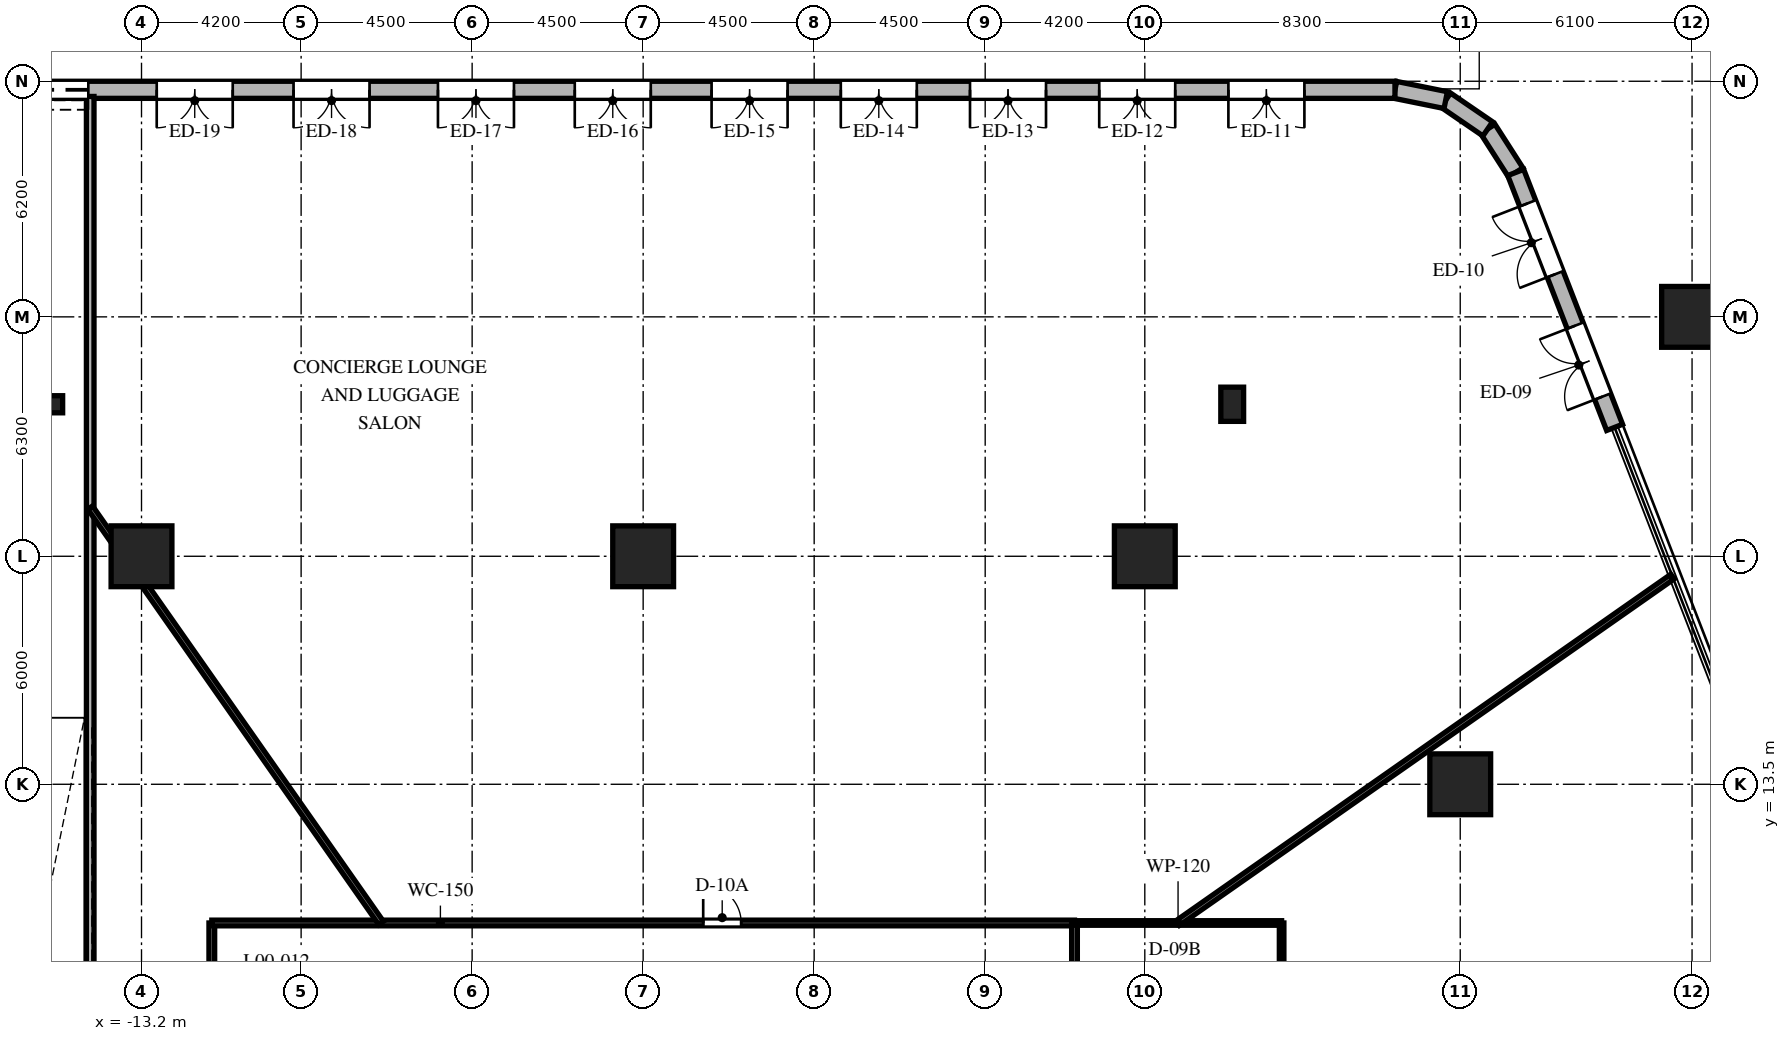
"""IFC4 building model, lengths in metres.
Left out: names, types, materials, properties, quantities, classifications, styles, units other than length and angle.
Written with IfcOpenShell. Run it as: python <this file> out.ifc"""

import sys

from ifc_helpers import new_model, si_unit, direction, frame, frame_2d, origin, origin_2d, place, context, subcontext, project, spatial, rectangle, extrude, element, fill, save


model = new_model("IFC4")
c1 = context("Model", 3, precision=1e-05, world=origin(), true_north=direction((0.0, 1.0)))
c2 = subcontext(c1, "Body", "Model", "MODEL_VIEW")
j1 = project(units=[si_unit("LENGTHUNIT", "METRE"), si_unit("PLANEANGLEUNIT", "RADIAN")], contexts=[c1])
p1 = place(None, origin())
s1 = spatial("IfcSite", under=j1, at=p1, CompositionType="ELEMENT")
p2 = place(p1, origin())
s2 = spatial("IfcBuilding", under=s1, at=p2, CompositionType="ELEMENT")
p3 = place(p2, origin())
s3 = spatial("IfcBuildingStorey", under=s2, at=p3, CompositionType="ELEMENT", Elevation=0.0)
for number, where, z_axis, x_axis in (
    (1, (21.5, 13.5, 0.0), (0.0, 0.0, 1.0), (1.0, 0.0, 0.0)),
    (2, (-13.2, 19.5, 0.0), (0.0, 0.0, 1.0), (1.0, 0.0, 0.0)),
    (3, (0.0, 19.5, 0.0), (0.0, 0.0, 1.0), (1.0, 0.0, 0.0)),
    (4, (13.2, 19.5, 0.0), (0.0, 0.0, 1.0), (1.0, 0.0, 0.0)),
    (5, (27.6, 25.8, 0.0), (0.0, 0.0, 1.0), (1.0, 0.0, 0.0)),
):
    element("IfcColumn", number, at=place(p3, frame(where, z_axis=z_axis, x_axis=x_axis)), inside=s3, PredefinedType="COLUMN", context=c2, shape_type="SweptSolid", body=[
        extrude(rectangle(XDim=1.6, YDim=1.6, at=origin_2d()), origin(), (0.0, 0.0, 1.0), 6.0),
    ])
p4 = place(p3, frame((15.5, 23.5, 0.0), z_axis=(0.0, 0.0, 1.0), x_axis=(1.0, 0.0, 0.0)))
e6 = element("IfcColumn", 6, at=p4, inside=s3, PredefinedType="PILASTER", context=c2, shape_type="SweptSolid", body=[
    extrude(rectangle(XDim=0.6, YDim=0.9, at=origin_2d()), origin(), (0.0, 0.0, 1.0), 6.0),
])
p5 = place(p3, frame((-15.5, 23.5, 0.0), z_axis=(0.0, 0.0, 1.0), x_axis=(1.0, 0.0, 0.0)))
e7 = element("IfcColumn", 7, at=p5, inside=s3, PredefinedType="PILASTER", context=c2, shape_type="SweptSolid", body=[
    extrude(rectangle(XDim=0.45, YDim=0.45, at=origin_2d()), origin(), (0.0, 0.0, 1.0), 6.0),
])
p6 = place(p3, frame((22.96, 29.6, 0.0), z_axis=(0.0, 0.0, 1.0), x_axis=(-0.539770293074, 0.841812348873, 0.0)))
e8 = element("IfcWall", 8, at=p6, inside=s3, PredefinedType="SOLIDWALL", context=c2, shape_type="SweptSolid", body=[
    extrude(rectangle(XDim=1.363, YDim=0.45, at=frame_2d((0.681, 0.0))), origin(), (0.0, 0.0, 1.0), 4.65),
])
p7 = place(p3, frame((22.224, 30.747, 0.0), z_axis=(0.0, 0.0, 1.0), x_axis=(-0.825034601946, 0.565082211357, 0.0)))
e9 = element("IfcWall", 9, at=p7, inside=s3, PredefinedType="SOLIDWALL", context=c2, shape_type="SweptSolid", body=[
    extrude(rectangle(XDim=1.34, YDim=0.45, at=frame_2d((0.67, 0.0))), origin(), (0.0, 0.0, 1.0), 4.65),
])
p8 = place(p3, frame((21.118, 31.504, 0.0), z_axis=(0.0, 0.0, 1.0), x_axis=(-0.980074574112, 0.198629879877, 0.0)))
e10 = element("IfcWall", 10, at=p8, inside=s3, PredefinedType="SOLIDWALL", context=c2, shape_type="SweptSolid", body=[
    extrude(rectangle(XDim=1.363, YDim=0.45, at=frame_2d((0.682, 0.0))), origin(), (0.0, 0.0, 1.0), 4.65),
])
p9 = place(p3, frame((25.562, 22.891, 0.0), z_axis=(0.0, 0.0, 1.0), x_axis=(-0.361665095845, 0.932308081295, 0.0)))
e11 = element("IfcWall", 11, at=p9, inside=s3, PredefinedType="SOLIDWALL", context=c2, shape_type="SweptSolid", body=[
    extrude(rectangle(XDim=7.195, YDim=0.45, at=frame_2d((3.598, 0.0))), origin(), (0.0, 0.0, 1.0), 4.65),
])
p10 = place(p9, frame((0.871, 0.0, 0.0)))
e12 = element("IfcOpeningElement", 12, at=p10, cuts=e11, PredefinedType="OPENING", context=c2, shape_type="SweptSolid", body=[
    extrude(rectangle(XDim=2.0, YDim=2.4, at=frame_2d((1.0, 1.2))), frame((0.0, 0.235, 0.0), z_axis=(0.0, -1.0, 0.0), x_axis=(1.0, 0.0, 0.0)), (0.0, 0.0, 1.0), 0.47),
])
p11 = place(p9, frame((4.324, 0.0, 0.0)))
e13 = element("IfcOpeningElement", 13, at=p11, cuts=e11, PredefinedType="OPENING", context=c2, shape_type="SweptSolid", body=[
    extrude(rectangle(XDim=2.0, YDim=2.4, at=frame_2d((1.0, 1.2))), frame((0.0, 0.235, 0.0), z_axis=(0.0, -1.0, 0.0), x_axis=(1.0, 0.0, 0.0)), (0.0, 0.0, 1.0), 0.47),
])
p12 = place(p3, frame((19.782, 31.775, 0.0), z_axis=(0.0, 0.0, 1.0), x_axis=(-1.0, 0.0, 0.0)))
e14 = element("IfcWall", 14, at=p12, inside=s3, PredefinedType="SOLIDWALL", context=c2, shape_type="SweptSolid", body=[
    extrude(rectangle(XDim=42.295, YDim=0.45, at=frame_2d((21.148, 0.0))), origin(), (0.0, 0.0, 1.0), 4.65),
])
p13 = place(p12, frame((34.382, 0.0, 0.0)))
e15 = element("IfcOpeningElement", 15, at=p13, cuts=e14, PredefinedType="OPENING", context=c2, shape_type="SweptSolid", body=[
    extrude(rectangle(XDim=6.4, YDim=3.2, at=frame_2d((3.2, 1.6))), frame((0.0, 0.235, 0.0), z_axis=(0.0, -1.0, 0.0), x_axis=(1.0, 0.0, 0.0)), (0.0, 0.0, 1.0), 0.47),
])
p14 = place(p12, frame((2.383, 0.0, 0.0)))
e16 = element("IfcOpeningElement", 16, at=p14, cuts=e14, PredefinedType="OPENING", context=c2, shape_type="SweptSolid", body=[
    extrude(rectangle(XDim=2.0, YDim=2.4, at=frame_2d((1.0, 1.2))), frame((0.0, 0.235, 0.0), z_axis=(0.0, -1.0, 0.0), x_axis=(1.0, 0.0, 0.0)), (0.0, 0.0, 1.0), 0.47),
])
p15 = place(p12, frame((5.782, 0.0, 0.0)))
e17 = element("IfcOpeningElement", 17, at=p15, cuts=e14, PredefinedType="OPENING", context=c2, shape_type="SweptSolid", body=[
    extrude(rectangle(XDim=2.0, YDim=2.4, at=frame_2d((1.0, 1.2))), frame((0.0, 0.235, 0.0), z_axis=(0.0, -1.0, 0.0), x_axis=(1.0, 0.0, 0.0)), (0.0, 0.0, 1.0), 0.47),
])
p16 = place(p12, frame((9.182, 0.0, 0.0)))
e18 = element("IfcOpeningElement", 18, at=p16, cuts=e14, PredefinedType="OPENING", context=c2, shape_type="SweptSolid", body=[
    extrude(rectangle(XDim=2.0, YDim=2.4, at=frame_2d((1.0, 1.2))), frame((0.0, 0.235, 0.0), z_axis=(0.0, -1.0, 0.0), x_axis=(1.0, 0.0, 0.0)), (0.0, 0.0, 1.0), 0.47),
])
p17 = place(p12, frame((12.582, 0.0, 0.0)))
e19 = element("IfcOpeningElement", 19, at=p17, cuts=e14, PredefinedType="OPENING", context=c2, shape_type="SweptSolid", body=[
    extrude(rectangle(XDim=2.0, YDim=2.4, at=frame_2d((1.0, 1.2))), frame((0.0, 0.235, 0.0), z_axis=(0.0, -1.0, 0.0), x_axis=(1.0, 0.0, 0.0)), (0.0, 0.0, 1.0), 0.47),
])
p18 = place(p12, frame((15.982, 0.0, 0.0)))
e20 = element("IfcOpeningElement", 20, at=p18, cuts=e14, PredefinedType="OPENING", context=c2, shape_type="SweptSolid", body=[
    extrude(rectangle(XDim=2.0, YDim=2.4, at=frame_2d((1.0, 1.2))), frame((0.0, 0.235, 0.0), z_axis=(0.0, -1.0, 0.0), x_axis=(1.0, 0.0, 0.0)), (0.0, 0.0, 1.0), 0.47),
])
p19 = place(p12, frame((19.582, 0.0, 0.0)))
e21 = element("IfcOpeningElement", 21, at=p19, cuts=e14, PredefinedType="OPENING", context=c2, shape_type="SweptSolid", body=[
    extrude(rectangle(XDim=2.0, YDim=2.4, at=frame_2d((1.0, 1.2))), frame((0.0, 0.235, 0.0), z_axis=(0.0, -1.0, 0.0), x_axis=(1.0, 0.0, 0.0)), (0.0, 0.0, 1.0), 0.47),
])
p20 = place(p12, frame((23.182, 0.0, 0.0)))
e22 = element("IfcOpeningElement", 22, at=p20, cuts=e14, PredefinedType="OPENING", context=c2, shape_type="SweptSolid", body=[
    extrude(rectangle(XDim=2.0, YDim=2.4, at=frame_2d((1.0, 1.2))), frame((0.0, 0.235, 0.0), z_axis=(0.0, -1.0, 0.0), x_axis=(1.0, 0.0, 0.0)), (0.0, 0.0, 1.0), 0.47),
])
p21 = place(p12, frame((26.982, 0.0, 0.0)))
e23 = element("IfcOpeningElement", 23, at=p21, cuts=e14, PredefinedType="OPENING", context=c2, shape_type="SweptSolid", body=[
    extrude(rectangle(XDim=2.0, YDim=2.4, at=frame_2d((1.0, 1.2))), frame((0.0, 0.235, 0.0), z_axis=(0.0, -1.0, 0.0), x_axis=(1.0, 0.0, 0.0)), (0.0, 0.0, 1.0), 0.47),
])
p22 = place(p12, frame((30.582, 0.0, 0.0)))
e24 = element("IfcOpeningElement", 24, at=p22, cuts=e14, PredefinedType="OPENING", context=c2, shape_type="SweptSolid", body=[
    extrude(rectangle(XDim=2.0, YDim=2.4, at=frame_2d((1.0, 1.2))), frame((0.0, 0.235, 0.0), z_axis=(0.0, -1.0, 0.0), x_axis=(1.0, 0.0, 0.0)), (0.0, 0.0, 1.0), 0.47),
])
p23 = place(p3, frame((-11.35, -9.85, 0.0), z_axis=(0.0, 0.0, 1.0), x_axis=(0.0, 1.0, 0.0)))
e25 = element("IfcWall", 25, at=p23, inside=s3, PredefinedType="PARTITIONING", context=c2, shape_type="SweptSolid", body=[
    extrude(rectangle(XDim=19.7, YDim=0.15, at=frame_2d((9.85, 0.0))), origin(), (0.0, 0.0, 1.0), 4.722),
])
p24 = place(p23, frame((9.35, 0.0, 0.0)))
e26 = element("IfcOpeningElement", 26, at=p24, cuts=e25, PredefinedType="OPENING", context=c2, shape_type="SweptSolid", body=[
    extrude(rectangle(XDim=1.0, YDim=2.03, at=frame_2d((0.5, 1.015))), frame((0.0, 0.085, 0.0), z_axis=(0.0, -1.0, 0.0), x_axis=(1.0, 0.0, 0.0)), (0.0, 0.0, 1.0), 0.17),
])
p25 = place(p3, frame((-11.35, 9.85, 0.0), z_axis=(0.0, 0.0, 1.0), x_axis=(1.0, 0.0, 0.0)))
e27 = element("IfcWall", 27, at=p25, inside=s3, PredefinedType="PARTITIONING", context=c2, shape_type="SweptSolid", body=[
    extrude(rectangle(XDim=22.7, YDim=0.15, at=frame_2d((11.35, 0.0))), origin(), (0.0, 0.0, 1.0), 4.722),
])
p26 = place(p25, frame((12.93, 0.0, 0.0)))
e28 = element("IfcOpeningElement", 28, at=p26, cuts=e27, PredefinedType="OPENING", context=c2, shape_type="SweptSolid", body=[
    extrude(rectangle(XDim=1.0, YDim=2.03, at=frame_2d((0.5, 1.015))), frame((0.0, 0.085, 0.0), z_axis=(0.0, -1.0, 0.0), x_axis=(1.0, 0.0, 0.0)), (0.0, 0.0, 1.0), 0.17),
])
p27 = place(p3, frame((11.35, 9.85, 0.0), z_axis=(0.0, 0.0, 1.0), x_axis=(0.0, -1.0, 0.0)))
e29 = element("IfcWall", 29, at=p27, inside=s3, PredefinedType="PARTITIONING", context=c2, shape_type="SweptSolid", body=[
    extrude(rectangle(XDim=19.7, YDim=0.15, at=frame_2d((9.85, 0.0))), origin(), (0.0, 0.0, 1.0), 4.722),
])
p28 = place(p27, frame((3.825, 0.0, 0.0)))
e30 = element("IfcOpeningElement", 30, at=p28, cuts=e29, PredefinedType="OPENING", context=c2, shape_type="SweptSolid", body=[
    extrude(rectangle(XDim=1.05, YDim=2.15, at=frame_2d((0.525, 1.075))), frame((0.0, 0.085, 0.0), z_axis=(0.0, -1.0, 0.0), x_axis=(1.0, 0.0, 0.0)), (0.0, 0.0, 1.0), 0.17),
])
p29 = place(p27, frame((2.1, 0.0, 0.0)))
e31 = element("IfcOpeningElement", 31, at=p29, cuts=e29, PredefinedType="OPENING", context=c2, shape_type="SweptSolid", body=[
    extrude(rectangle(XDim=0.9, YDim=2.03, at=frame_2d((0.45, 1.015))), frame((0.0, 0.085, 0.0), z_axis=(0.0, -1.0, 0.0), x_axis=(1.0, 0.0, 0.0)), (0.0, 0.0, 1.0), 0.17),
])
p30 = place(p27, frame((16.875, 0.0, 0.0)))
e32 = element("IfcOpeningElement", 32, at=p30, cuts=e29, PredefinedType="OPENING", context=c2, shape_type="SweptSolid", body=[
    extrude(rectangle(XDim=1.0, YDim=2.03, at=frame_2d((0.5, 1.015))), frame((0.0, 0.085, 0.0), z_axis=(0.0, -1.0, 0.0), x_axis=(1.0, 0.0, 0.0)), (0.0, 0.0, 1.0), 0.17),
])
p31 = place(p3, frame((-14.55, -16.0, 0.0), z_axis=(0.0, 0.0, 1.0), x_axis=(0.0, 1.0, 0.0)))
e33 = element("IfcWall", 33, at=p31, inside=s3, PredefinedType="PARTITIONING", context=c2, shape_type="SweptSolid", body=[
    extrude(rectangle(XDim=47.6, YDim=0.2, at=frame_2d((23.8, 0.0))), origin(), (0.0, 0.0, 1.0), 4.67),
])
p32 = place(p3, frame((16.8, 6.45, 0.0), z_axis=(0.0, 0.0, 1.0), x_axis=(0.0, 1.0, 0.0)))
e34 = element("IfcWall", 34, at=p32, inside=s3, PredefinedType="PARTITIONING", context=c2, shape_type="SweptSolid", body=[
    extrude(rectangle(XDim=3.4, YDim=0.12, at=frame_2d((1.7, 0.0))), origin(), (0.0, 0.0, 1.0), 5.68),
])
p33 = place(p3, frame((11.35, 9.85, 0.0), z_axis=(0.0, 0.0, 1.0), x_axis=(1.0, 0.0, 0.0)))
e35 = element("IfcWall", 35, at=p33, inside=s3, PredefinedType="PARTITIONING", context=c2, shape_type="SweptSolid", body=[
    extrude(rectangle(XDim=5.45, YDim=0.12, at=frame_2d((2.725, 0.0))), origin(), (0.0, 0.0, 1.0), 4.814),
])
p34 = place(p3, frame((14.067, 9.85, 0.0), z_axis=(0.0, 0.0, 1.0), x_axis=(0.819152520239, 0.573575756623, 0.0)))
e36 = element("IfcWall", 36, at=p34, inside=s3, PredefinedType="PARTITIONING", context=c2, shape_type="SweptSolid", body=[
    extrude(rectangle(XDim=15.892, YDim=0.15, at=frame_2d((7.946, 0.0))), origin(), (0.0, 0.0, 1.0), 4.722),
])
p35 = place(p3, frame((-6.897, 9.85, 0.0), z_axis=(0.0, 0.0, 1.0), x_axis=(-0.57358637099, 0.81914508789, 0.0)))
e37 = element("IfcWall", 37, at=p35, inside=s3, PredefinedType="PARTITIONING", context=c2, shape_type="SweptSolid", body=[
    extrude(rectangle(XDim=13.343, YDim=0.15, at=frame_2d((6.671, 0.0))), origin(), (0.0, 0.0, 1.0), 4.67),
])
p36 = place(p10, origin())
e38 = element("IfcDoor", 38, at=p36, inside=s3, OperationType="DOUBLE_SWING_LEFT", PredefinedType="DOOR", context=c2, shape_type="SweptSolid", body=[
    extrude(rectangle(XDim=2.0, YDim=2.4, at=frame_2d((1.0, 1.2))), frame((0.0, 0.025, 0.0), z_axis=(0.0, -1.0, 0.0), x_axis=(1.0, 0.0, 0.0)), (0.0, 0.0, 1.0), 0.05),
])
fill(e12, e38)
p37 = place(p11, origin())
e39 = element("IfcDoor", 39, at=p37, inside=s3, OperationType="DOUBLE_SWING_LEFT", PredefinedType="DOOR", context=c2, shape_type="SweptSolid", body=[
    extrude(rectangle(XDim=2.0, YDim=2.4, at=frame_2d((1.0, 1.2))), frame((0.0, 0.025, 0.0), z_axis=(0.0, -1.0, 0.0), x_axis=(1.0, 0.0, 0.0)), (0.0, 0.0, 1.0), 0.05),
])
fill(e13, e39)
p38 = place(p13, origin())
e40 = element("IfcDoor", 40, at=p38, inside=s3, OperationType="ROLLINGUP", PredefinedType="GATE", context=c2, shape_type="SweptSolid", body=[
    extrude(rectangle(XDim=6.4, YDim=3.2, at=frame_2d((3.2, 1.6))), frame((0.0, 0.025, 0.0), z_axis=(0.0, -1.0, 0.0), x_axis=(1.0, 0.0, 0.0)), (0.0, 0.0, 1.0), 0.05),
])
fill(e15, e40)
p39 = place(p14, origin())
e41 = element("IfcDoor", 41, at=p39, inside=s3, OperationType="DOUBLE_SWING_LEFT", PredefinedType="DOOR", context=c2, shape_type="SweptSolid", body=[
    extrude(rectangle(XDim=2.0, YDim=2.4, at=frame_2d((1.0, 1.2))), frame((0.0, 0.025, 0.0), z_axis=(0.0, -1.0, 0.0), x_axis=(1.0, 0.0, 0.0)), (0.0, 0.0, 1.0), 0.05),
])
fill(e16, e41)
p40 = place(p15, origin())
e42 = element("IfcDoor", 42, at=p40, inside=s3, OperationType="DOUBLE_SWING_LEFT", PredefinedType="DOOR", context=c2, shape_type="SweptSolid", body=[
    extrude(rectangle(XDim=2.0, YDim=2.4, at=frame_2d((1.0, 1.2))), frame((0.0, 0.025, 0.0), z_axis=(0.0, -1.0, 0.0), x_axis=(1.0, 0.0, 0.0)), (0.0, 0.0, 1.0), 0.05),
])
fill(e17, e42)
p41 = place(p16, origin())
e43 = element("IfcDoor", 43, at=p41, inside=s3, OperationType="DOUBLE_SWING_LEFT", PredefinedType="DOOR", context=c2, shape_type="SweptSolid", body=[
    extrude(rectangle(XDim=2.0, YDim=2.4, at=frame_2d((1.0, 1.2))), frame((0.0, 0.025, 0.0), z_axis=(0.0, -1.0, 0.0), x_axis=(1.0, 0.0, 0.0)), (0.0, 0.0, 1.0), 0.05),
])
fill(e18, e43)
p42 = place(p17, origin())
e44 = element("IfcDoor", 44, at=p42, inside=s3, OperationType="DOUBLE_SWING_LEFT", PredefinedType="DOOR", context=c2, shape_type="SweptSolid", body=[
    extrude(rectangle(XDim=2.0, YDim=2.4, at=frame_2d((1.0, 1.2))), frame((0.0, 0.025, 0.0), z_axis=(0.0, -1.0, 0.0), x_axis=(1.0, 0.0, 0.0)), (0.0, 0.0, 1.0), 0.05),
])
fill(e19, e44)
p43 = place(p18, origin())
e45 = element("IfcDoor", 45, at=p43, inside=s3, OperationType="DOUBLE_SWING_LEFT", PredefinedType="DOOR", context=c2, shape_type="SweptSolid", body=[
    extrude(rectangle(XDim=2.0, YDim=2.4, at=frame_2d((1.0, 1.2))), frame((0.0, 0.025, 0.0), z_axis=(0.0, -1.0, 0.0), x_axis=(1.0, 0.0, 0.0)), (0.0, 0.0, 1.0), 0.05),
])
fill(e20, e45)
p44 = place(p19, origin())
e46 = element("IfcDoor", 46, at=p44, inside=s3, OperationType="DOUBLE_SWING_LEFT", PredefinedType="DOOR", context=c2, shape_type="SweptSolid", body=[
    extrude(rectangle(XDim=2.0, YDim=2.4, at=frame_2d((1.0, 1.2))), frame((0.0, 0.025, 0.0), z_axis=(0.0, -1.0, 0.0), x_axis=(1.0, 0.0, 0.0)), (0.0, 0.0, 1.0), 0.05),
])
fill(e21, e46)
p45 = place(p20, origin())
e47 = element("IfcDoor", 47, at=p45, inside=s3, OperationType="DOUBLE_SWING_LEFT", PredefinedType="DOOR", context=c2, shape_type="SweptSolid", body=[
    extrude(rectangle(XDim=2.0, YDim=2.4, at=frame_2d((1.0, 1.2))), frame((0.0, 0.025, 0.0), z_axis=(0.0, -1.0, 0.0), x_axis=(1.0, 0.0, 0.0)), (0.0, 0.0, 1.0), 0.05),
])
fill(e22, e47)
p46 = place(p21, origin())
e48 = element("IfcDoor", 48, at=p46, inside=s3, OperationType="DOUBLE_SWING_LEFT", PredefinedType="DOOR", context=c2, shape_type="SweptSolid", body=[
    extrude(rectangle(XDim=2.0, YDim=2.4, at=frame_2d((1.0, 1.2))), frame((0.0, 0.025, 0.0), z_axis=(0.0, -1.0, 0.0), x_axis=(1.0, 0.0, 0.0)), (0.0, 0.0, 1.0), 0.05),
])
fill(e23, e48)
p47 = place(p22, origin())
e49 = element("IfcDoor", 49, at=p47, inside=s3, OperationType="DOUBLE_SWING_LEFT", PredefinedType="DOOR", context=c2, shape_type="SweptSolid", body=[
    extrude(rectangle(XDim=2.0, YDim=2.4, at=frame_2d((1.0, 1.2))), frame((0.0, 0.025, 0.0), z_axis=(0.0, -1.0, 0.0), x_axis=(1.0, 0.0, 0.0)), (0.0, 0.0, 1.0), 0.05),
])
fill(e24, e49)
p48 = place(p26, origin())
e50 = element("IfcDoor", 50, at=p48, inside=s3, OperationType="SINGLE_SWING_LEFT", PredefinedType="DOOR", context=c2, shape_type="SweptSolid", body=[
    extrude(rectangle(XDim=1.0, YDim=2.03, at=frame_2d((0.5, 1.015))), frame((0.0, 0.025, 0.0), z_axis=(0.0, -1.0, 0.0), x_axis=(1.0, 0.0, 0.0)), (0.0, 0.0, 1.0), 0.05),
])
fill(e28, e50)
save(model, sys.argv[1])
